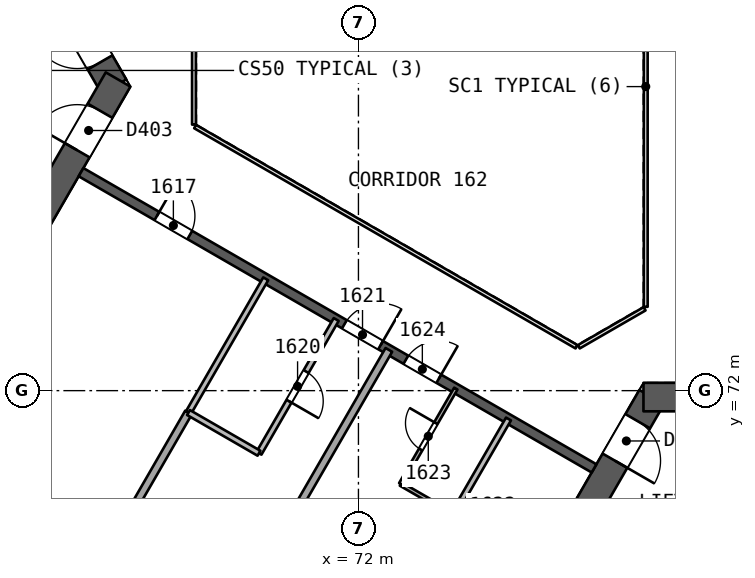
"""IFC4 building model, lengths in metres.
Left out: names, types, materials, properties, quantities, classifications, styles, units other than length and angle.
Written with IfcOpenShell. Run it as: python <this file> out.ifc"""

import sys

from ifc_helpers import new_model, si_unit, direction, frame, frame_2d, origin, place, context, subcontext, project, spatial, rectangle, extrude, element, fill, save


model = new_model("IFC4")
c1 = context("Model", 3, precision=1e-05, world=origin(), true_north=direction((0.0, 1.0)))
c2 = subcontext(c1, "Body", "Model", "MODEL_VIEW")
j1 = project(units=[si_unit("LENGTHUNIT", "METRE"), si_unit("PLANEANGLEUNIT", "RADIAN")], contexts=[c1])
p1 = place(None, origin())
s1 = spatial("IfcSite", under=j1, at=p1, CompositionType="ELEMENT")
p2 = place(p1, origin())
s2 = spatial("IfcBuilding", under=s1, at=p2, CompositionType="ELEMENT")
p3 = place(p2, frame((0.0, 0.0, 72.1)))
s3 = spatial("IfcBuildingStorey", under=s2, at=p3, CompositionType="ELEMENT", Elevation=72.1)
p4 = place(p3, frame((65.567, 80.0, 0.0), z_axis=(0.0, 0.0, 1.0), x_axis=(-0.499988615364, 0.866031976607, 0.0)))
e1 = element("IfcWall", 1, at=p4, inside=s3, PredefinedType="SHEAR", context=c2, shape_type="SweptSolid", body=[
    extrude(rectangle(XDim=10.163, YDim=0.75, at=frame_2d((5.082, 0.0))), origin(), (0.0, 0.0, 1.0), 3.7),
])
p5 = place(p4, frame((0.733, 0.0, 0.0)))
e2 = element("IfcOpeningElement", 2, at=p5, cuts=e1, PredefinedType="OPENING", context=c2, shape_type="SweptSolid", body=[
    extrude(rectangle(XDim=1.2, YDim=2.1, at=frame_2d((0.6, 1.05))), frame((0.0, 0.385, 0.0), z_axis=(0.0, -1.0, 0.0), x_axis=(1.0, 0.0, 0.0)), (0.0, 0.0, 1.0), 0.771),
])
p6 = place(p3, frame((60.673, 71.523, 0.0), z_axis=(0.0, 0.0, 1.0), x_axis=(0.499997052475, 0.866027105532, 0.0)))
e3 = element("IfcWall", 3, at=p6, inside=s3, PredefinedType="SHEAR", context=c2, shape_type="SweptSolid", body=[
    extrude(rectangle(XDim=10.005, YDim=0.75, at=frame_2d((5.002, 0.0))), origin(), (0.0, 0.0, 1.0), 3.7),
])
p7 = place(p6, frame((7.855, 0.0, 0.0)))
e4 = element("IfcOpeningElement", 4, at=p7, cuts=e3, PredefinedType="OPENING", context=c2, shape_type="SweptSolid", body=[
    extrude(rectangle(XDim=1.2, YDim=2.1, at=frame_2d((0.6, 1.05))), frame((0.0, 0.385, 0.0), z_axis=(0.0, -1.0, 0.0), x_axis=(1.0, 0.0, 0.0)), (0.0, 0.0, 1.0), 0.771),
])
p8 = place(p3, frame((79.717, 71.831, 0.0), z_axis=(0.0, 0.0, 1.0), x_axis=(-0.499996230114, -0.866027580318, 0.0)))
e5 = element("IfcWall", 5, at=p8, inside=s3, PredefinedType="SHEAR", context=c2, shape_type="SweptSolid", body=[
    extrude(rectangle(XDim=10.164, YDim=0.75, at=frame_2d((5.082, 0.0))), origin(), (0.0, 0.0, 1.0), 3.7),
])
p9 = place(p8, frame((0.733, 0.0, 0.0)))
e6 = element("IfcOpeningElement", 6, at=p9, cuts=e5, PredefinedType="OPENING", context=c2, shape_type="SweptSolid", body=[
    extrude(rectangle(XDim=1.2, YDim=2.1, at=frame_2d((0.6, 1.05))), frame((0.0, 0.385, 0.0), z_axis=(0.0, -1.0, 0.0), x_axis=(1.0, 0.0, 0.0)), (0.0, 0.0, 1.0), 0.771),
])
p10 = place(p3, frame((89.505, 71.831, 0.0), z_axis=(0.0, 0.0, 1.0), x_axis=(-1.0, 0.0, 0.0)))
e7 = element("IfcWall", 7, at=p10, inside=s3, PredefinedType="SHEAR", context=c2, shape_type="SweptSolid", body=[
    extrude(rectangle(XDim=10.005, YDim=0.75, at=frame_2d((5.002, 0.0))), origin(), (0.0, 0.0, 1.0), 3.7),
])
p11 = place(p10, frame((7.855, 0.0, 0.0)))
e8 = element("IfcOpeningElement", 8, at=p11, cuts=e7, PredefinedType="OPENING", context=c2, shape_type="SweptSolid", body=[
    extrude(rectangle(XDim=1.2, YDim=2.1, at=frame_2d((0.6, 1.05))), frame((0.0, 0.385, 0.0), z_axis=(0.0, -1.0, 0.0), x_axis=(1.0, 0.0, 0.0)), (0.0, 0.0, 1.0), 0.771),
])
p12 = place(p3, frame((64.7, 77.748, 0.0), z_axis=(0.0, 0.0, 1.0), x_axis=(0.866026492143, -0.499998114903, 0.0)))
e9 = element("IfcWall", 9, at=p12, inside=s3, PredefinedType="SHEAR", context=c2, shape_type="SweptSolid", body=[
    extrude(rectangle(XDim=15.588, YDim=0.25, at=frame_2d((7.794, 0.0))), origin(), (0.0, 0.0, 1.0), 3.2),
])
p13 = place(p12, frame((2.306, 0.0, 0.0)))
e10 = element("IfcOpeningElement", 10, at=p13, cuts=e9, PredefinedType="OPENING", context=c2, shape_type="SweptSolid", body=[
    extrude(rectangle(XDim=1.0, YDim=2.1, at=frame_2d((0.5, 1.05))), frame((0.0, 0.135, 0.0), z_axis=(0.0, -1.0, 0.0), x_axis=(1.0, 0.0, 0.0)), (0.0, 0.0, 1.0), 0.271),
])
p14 = place(p12, frame((8.003, 0.0, 0.0)))
e11 = element("IfcOpeningElement", 11, at=p14, cuts=e9, PredefinedType="OPENING", context=c2, shape_type="SweptSolid", body=[
    extrude(rectangle(XDim=1.1, YDim=2.1, at=frame_2d((0.55, 1.05))), frame((0.0, 0.135, 0.0), z_axis=(0.0, -1.0, 0.0), x_axis=(1.0, 0.0, 0.0)), (0.0, 0.0, 1.0), 0.271),
])
p15 = place(p12, frame((9.871, 0.0, 0.0)))
e12 = element("IfcOpeningElement", 12, at=p15, cuts=e9, PredefinedType="OPENING", context=c2, shape_type="SweptSolid", body=[
    extrude(rectangle(XDim=1.0, YDim=2.1, at=frame_2d((0.5, 1.05))), frame((0.0, 0.135, 0.0), z_axis=(0.0, -1.0, 0.0), x_axis=(1.0, 0.0, 0.0)), (0.0, 0.0, 1.0), 0.271),
])
p16 = place(p3, frame((62.859, 63.337, 0.0), z_axis=(0.0, 0.0, 1.0), x_axis=(0.500016660921, 0.866015784384, 0.0)))
e13 = element("IfcWall", 13, at=p16, inside=s3, PredefinedType="PARTITIONING", context=c2, shape_type="SweptSolid", body=[
    extrude(rectangle(XDim=9.338, YDim=0.2, at=frame_2d((4.669, 0.0))), origin(), (0.0, 0.0, 1.0), 3.2),
])
p17 = place(p3, frame((67.529, 71.424, 0.0), z_axis=(0.0, 0.0, 1.0), x_axis=(0.499984252764, 0.866034495264, 0.0)))
e14 = element("IfcWall", 14, at=p17, inside=s3, PredefinedType="PARTITIONING", context=c2, shape_type="SweptSolid", body=[
    extrude(rectangle(XDim=4.063, YDim=0.15, at=frame_2d((2.032, 0.0))), origin(), (0.0, 0.0, 1.0), 3.2),
])
p18 = place(p3, frame((71.414, 73.872, 0.0), z_axis=(0.0, 0.0, 1.0), x_axis=(-0.499984252764, -0.866034495264, 0.0)))
e15 = element("IfcWall", 15, at=p18, inside=s3, PredefinedType="PARTITIONING", context=c2, shape_type="SweptSolid", body=[
    extrude(rectangle(XDim=4.063, YDim=0.15, at=frame_2d((2.032, 0.0))), origin(), (0.0, 0.0, 1.0), 3.2),
])
p19 = place(p18, frame((1.582, 0.0, 0.0)))
e16 = element("IfcOpeningElement", 16, at=p19, cuts=e15, PredefinedType="OPENING", context=c2, shape_type="SweptSolid", body=[
    extrude(rectangle(XDim=0.9, YDim=2.1, at=frame_2d((0.45, 1.05))), frame((0.0, 0.085, 0.0), z_axis=(0.0, -1.0, 0.0), x_axis=(1.0, 0.0, 0.0)), (0.0, 0.0, 1.0), 0.171),
])
p20 = place(p3, frame((69.383, 70.353, 0.0), z_axis=(0.0, 0.0, 1.0), x_axis=(-0.866024183959, 0.500002112793, 0.0)))
e17 = element("IfcWall", 17, at=p20, inside=s3, PredefinedType="PARTITIONING", context=c2, shape_type="SweptSolid", body=[
    extrude(rectangle(XDim=2.141, YDim=0.15, at=frame_2d((1.071, 0.0))), origin(), (0.0, 0.0, 1.0), 3.2),
])
p21 = place(p3, frame((66.099, 61.466, 0.0), z_axis=(0.0, 0.0, 1.0), x_axis=(0.500006835139, 0.866021457479, 0.0)))
e18 = element("IfcWall", 18, at=p21, inside=s3, PredefinedType="PARTITIONING", context=c2, shape_type="SweptSolid", body=[
    extrude(rectangle(XDim=13.401, YDim=0.2, at=frame_2d((6.701, 0.0))), origin(), (0.0, 0.0, 1.0), 3.2),
])
p22 = place(p3, frame((74.498, 68.743, 0.0), z_axis=(0.0, 0.0, 1.0), x_axis=(-0.865989903783, 0.500061482766, 0.0)))
e19 = element("IfcWall", 19, at=p22, inside=s3, PredefinedType="PARTITIONING", context=c2, shape_type="SweptSolid", body=[
    extrude(rectangle(XDim=1.6, YDim=0.1, at=frame_2d((0.8, 0.0))), origin(), (0.0, 0.0, 1.0), 3.2),
])
p23 = place(p3, frame((73.113, 69.543, 0.0), z_axis=(0.0, 0.0, 1.0), x_axis=(0.499987231761, 0.866032775405, 0.0)))
e20 = element("IfcWall", 20, at=p23, inside=s3, PredefinedType="PARTITIONING", context=c2, shape_type="SweptSolid", body=[
    extrude(rectangle(XDim=2.9, YDim=0.1, at=frame_2d((1.45, 0.0))), origin(), (0.0, 0.0, 1.0), 3.2),
])
p24 = place(p23, frame((1.05, 0.0, 0.0)))
e21 = element("IfcOpeningElement", 21, at=p24, cuts=e20, PredefinedType="OPENING", context=c2, shape_type="SweptSolid", body=[
    extrude(rectangle(XDim=0.8, YDim=2.1, at=frame_2d((0.4, 1.05))), frame((0.0, 0.061, 0.0), z_axis=(0.0, -1.0, 0.0), x_axis=(1.0, 0.0, 0.0)), (0.0, 0.0, 1.0), 0.121),
])
p25 = place(p3, frame((75.948, 71.254, 0.0), z_axis=(0.0, 0.0, 1.0), x_axis=(-0.499987231761, -0.866032775405, 0.0)))
e22 = element("IfcWall", 22, at=p25, inside=s3, PredefinedType="PARTITIONING", context=c2, shape_type="SweptSolid", body=[
    extrude(rectangle(XDim=2.9, YDim=0.15, at=frame_2d((1.45, 0.0))), origin(), (0.0, 0.0, 1.0), 3.2),
])
p26 = place(p3, frame((90.388, 47.271, 0.0), z_axis=(0.0, 0.0, 1.0), x_axis=(-0.866024483997, 0.500001593116, 0.0)))
e23 = element("IfcWall", 23, at=p26, inside=s3, PredefinedType="SOLIDWALL", context=c2, shape_type="SweptSolid", body=[
    extrude(rectangle(XDim=59.381, YDim=0.3, at=frame_2d((29.69, 0.0))), origin(), (0.0, 0.0, 1.0), 3.2),
])
p27 = place(p26, frame((28.802, 0.0, 0.0)))
e24 = element("IfcOpeningElement", 24, at=p27, cuts=e23, PredefinedType="OPENING", context=c2, shape_type="SweptSolid", body=[
    extrude(rectangle(XDim=2.4, YDim=2.4, at=frame_2d((1.2, 1.2))), frame((0.0, 0.161, 0.0), z_axis=(0.0, -1.0, 0.0), x_axis=(1.0, 0.0, 0.0)), (0.0, 0.0, 1.0), 0.321),
])
p28 = place(p26, frame((33.479, 0.0, 0.0)))
e25 = element("IfcOpeningElement", 25, at=p28, cuts=e23, PredefinedType="OPENING", context=c2, shape_type="SweptSolid", body=[
    extrude(rectangle(XDim=2.4, YDim=2.4, at=frame_2d((1.2, 1.2))), frame((0.0, 0.161, 0.0), z_axis=(0.0, -1.0, 0.0), x_axis=(1.0, 0.0, 0.0)), (0.0, 0.0, 1.0), 0.321),
])
p29 = place(p26, frame((46.066, 0.0, 0.0)))
e26 = element("IfcOpeningElement", 26, at=p29, cuts=e23, PredefinedType="OPENING", context=c2, shape_type="SweptSolid", body=[
    extrude(rectangle(XDim=2.4, YDim=2.4, at=frame_2d((1.2, 1.2))), frame((0.0, 0.161, 0.0), z_axis=(0.0, -1.0, 0.0), x_axis=(1.0, 0.0, 0.0)), (0.0, 0.0, 1.0), 0.321),
])
p30 = place(p26, frame((12.823, 0.0, 0.0)))
e27 = element("IfcOpeningElement", 27, at=p30, cuts=e23, PredefinedType="OPENING", context=c2, shape_type="SweptSolid", body=[
    extrude(rectangle(XDim=2.4, YDim=2.4, at=frame_2d((1.2, 1.2))), frame((0.0, 0.161, 0.0), z_axis=(0.0, -1.0, 0.0), x_axis=(1.0, 0.0, 0.0)), (0.0, 0.0, 1.0), 0.321),
])
p31 = place(p3, frame((77.135, 64.952, 0.0), z_axis=(0.0, 0.0, 1.0), x_axis=(0.866031916153, 0.499988720078, 0.0)))
e28 = element("IfcWall", 28, at=p31, inside=s3, PredefinedType="SOLIDWALL", context=c2, shape_type="SweptSolid", body=[
    extrude(rectangle(XDim=11.35, YDim=0.2, at=frame_2d((5.675, 0.0))), origin(), (0.0, 0.0, 1.0), 3.2),
])
p32 = place(p3, frame((79.56, 74.206, 0.0), z_axis=(0.0, 0.0, 1.0), x_axis=(0.0, 1.0, 0.0)))
e29 = element("IfcWall", 29, at=p32, inside=s3, PredefinedType="PARTITIONING", context=c2, shape_type="SweptSolid", body=[
    extrude(rectangle(XDim=11.588, YDim=0.1, at=frame_2d((5.794, 0.0))), origin(), (0.0, 0.0, 1.0), 3.2),
])
p33 = place(p3, frame((67.672, 81.0, 0.0), z_axis=(0.0, 0.0, 1.0), x_axis=(0.0, -1.0, 0.0)))
e30 = element("IfcWall", 30, at=p33, inside=s3, PredefinedType="PARTITIONING", context=c2, shape_type="SweptSolid", body=[
    extrude(rectangle(XDim=2.0, YDim=0.1, at=frame_2d((1.0, 0.0))), origin(), (0.0, 0.0, 1.0), 3.2),
])
p34 = place(p3, frame((67.702, 78.948, 0.0), z_axis=(0.0, 0.0, 1.0), x_axis=(0.866026658274, -0.499997827154, 0.0)))
e31 = element("IfcWall", 31, at=p34, inside=s3, PredefinedType="PARTITIONING", context=c2, shape_type="SweptSolid", body=[
    extrude(rectangle(XDim=11.588, YDim=0.1, at=frame_2d((5.794, 0.0))), origin(), (0.0, 0.0, 1.0), 3.2),
])
p35 = place(p3, frame((77.798, 73.154, 0.0), z_axis=(0.0, 0.0, 1.0), x_axis=(0.866041268327, 0.499972520799, 0.0)))
e32 = element("IfcWall", 32, at=p35, inside=s3, PredefinedType="PARTITIONING", context=c2, shape_type="SweptSolid", body=[
    extrude(rectangle(XDim=2.0, YDim=0.1, at=frame_2d((1.0, 0.0))), origin(), (0.0, 0.0, 1.0), 3.2),
])
p36 = place(p13, origin())
e33 = element("IfcDoor", 33, at=p36, inside=s3, OperationType="SINGLE_SWING_LEFT", PredefinedType="NOTDEFINED", context=c2, shape_type="SweptSolid", body=[
    extrude(rectangle(XDim=1.0, YDim=2.1, at=frame_2d((0.5, 1.05))), frame((0.0, 0.025, 0.0), z_axis=(0.0, -1.0, 0.0), x_axis=(1.0, 0.0, 0.0)), (0.0, 0.0, 1.0), 0.05),
])
fill(e10, e33)
p37 = place(p19, origin())
e34 = element("IfcDoor", 34, at=p37, inside=s3, OperationType="SINGLE_SWING_RIGHT", PredefinedType="NOTDEFINED", context=c2, shape_type="SweptSolid", body=[
    extrude(rectangle(XDim=0.9, YDim=2.1, at=frame_2d((0.45, 1.05))), frame((0.0, 0.025, 0.0), z_axis=(0.0, -1.0, 0.0), x_axis=(1.0, 0.0, 0.0)), (0.0, 0.0, 1.0), 0.05),
])
fill(e16, e34)
p38 = place(p14, origin())
e35 = element("IfcDoor", 35, at=p38, inside=s3, OperationType="SINGLE_SWING_RIGHT", PredefinedType="NOTDEFINED", context=c2, shape_type="SweptSolid", body=[
    extrude(rectangle(XDim=1.1, YDim=2.1, at=frame_2d((0.55, 1.05))), frame((0.0, 0.025, 0.0), z_axis=(0.0, -1.0, 0.0), x_axis=(1.0, 0.0, 0.0)), (0.0, 0.0, 1.0), 0.05),
])
fill(e11, e35)
p39 = place(p24, origin())
e36 = element("IfcDoor", 36, at=p39, inside=s3, OperationType="SINGLE_SWING_RIGHT", PredefinedType="NOTDEFINED", context=c2, shape_type="SweptSolid", body=[
    extrude(rectangle(XDim=0.8, YDim=2.1, at=frame_2d((0.4, 1.05))), frame((0.0, 0.025, 0.0), z_axis=(0.0, -1.0, 0.0), x_axis=(1.0, 0.0, 0.0)), (0.0, 0.0, 1.0), 0.05),
])
fill(e21, e36)
p40 = place(p15, origin())
e37 = element("IfcDoor", 37, at=p40, inside=s3, OperationType="SINGLE_SWING_RIGHT", PredefinedType="NOTDEFINED", context=c2, shape_type="SweptSolid", body=[
    extrude(rectangle(XDim=1.0, YDim=2.1, at=frame_2d((0.5, 1.05))), frame((0.0, 0.025, 0.0), z_axis=(0.0, -1.0, 0.0), x_axis=(1.0, 0.0, 0.0)), (0.0, 0.0, 1.0), 0.05),
])
fill(e12, e37)
p41 = place(p5, origin())
e38 = element("IfcDoor", 38, at=p41, inside=s3, OperationType="SINGLE_SWING_RIGHT", PredefinedType="NOTDEFINED", context=c2, shape_type="SweptSolid", body=[
    extrude(rectangle(XDim=1.2, YDim=2.1, at=frame_2d((0.6, 1.05))), frame((0.0, 0.025, 0.0), z_axis=(0.0, -1.0, 0.0), x_axis=(1.0, 0.0, 0.0)), (0.0, 0.0, 1.0), 0.05),
])
fill(e2, e38)
p42 = place(p7, origin())
e39 = element("IfcDoor", 39, at=p42, inside=s3, OperationType="SINGLE_SWING_LEFT", PredefinedType="NOTDEFINED", context=c2, shape_type="SweptSolid", body=[
    extrude(rectangle(XDim=1.2, YDim=2.1, at=frame_2d((0.6, 1.05))), frame((0.0, 0.025, 0.0), z_axis=(0.0, -1.0, 0.0), x_axis=(1.0, 0.0, 0.0)), (0.0, 0.0, 1.0), 0.05),
])
fill(e4, e39)
p43 = place(p9, origin())
e40 = element("IfcDoor", 40, at=p43, inside=s3, OperationType="SINGLE_SWING_RIGHT", PredefinedType="NOTDEFINED", context=c2, shape_type="SweptSolid", body=[
    extrude(rectangle(XDim=1.2, YDim=2.1, at=frame_2d((0.6, 1.05))), frame((0.0, 0.025, 0.0), z_axis=(0.0, -1.0, 0.0), x_axis=(1.0, 0.0, 0.0)), (0.0, 0.0, 1.0), 0.05),
])
fill(e6, e40)
save(model, sys.argv[1])
